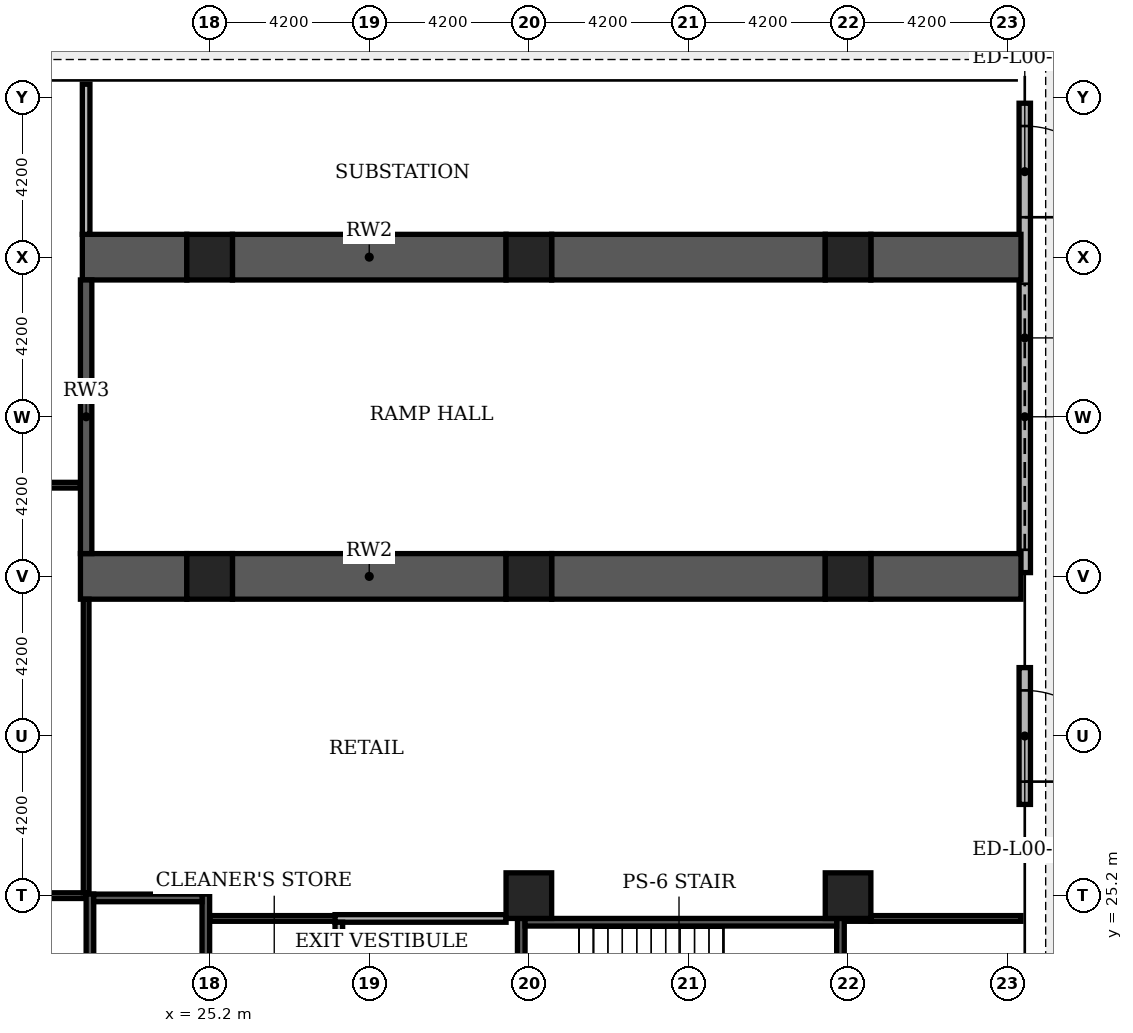
"""IFC4 building model, lengths in metres.
Left out: names, types, materials, properties, quantities, classifications, styles, units other than length and angle.
Written with IfcOpenShell. Run it as: python <this file> out.ifc"""

import sys

from ifc_helpers import new_model, si_unit, direction, frame, frame_2d, origin, origin_2d, place, context, subcontext, project, spatial, rectangle, extrude, element, fill, save


model = new_model("IFC4")
c1 = context("Model", 3, precision=1e-05, world=origin(), true_north=direction((0.0, 1.0)))
c2 = subcontext(c1, "Body", "Model", "MODEL_VIEW")
j1 = project(units=[si_unit("LENGTHUNIT", "METRE"), si_unit("PLANEANGLEUNIT", "RADIAN")], contexts=[c1])
p1 = place(None, origin())
s1 = spatial("IfcSite", under=j1, at=p1, CompositionType="ELEMENT")
p2 = place(p1, origin())
s2 = spatial("IfcBuilding", under=s1, at=p2, CompositionType="ELEMENT")
p3 = place(p2, origin())
s3 = spatial("IfcBuildingStorey", under=s2, at=p3, CompositionType="ELEMENT", Elevation=0.0)
for number, where, z_axis, x_axis in (
    (1, (25.2, 33.6, 0.0), (0.0, 0.0, 1.0), (1.0, 0.0, 0.0)),
    (2, (25.2, 42.0, 0.0), (0.0, 0.0, 1.0), (1.0, 0.0, 0.0)),
    (3, (33.6, 25.2, 0.0), (0.0, 0.0, 1.0), (1.0, 0.0, 0.0)),
    (4, (33.6, 33.6, 0.0), (0.0, 0.0, 1.0), (1.0, 0.0, 0.0)),
    (5, (33.6, 42.0, 0.0), (0.0, 0.0, 1.0), (1.0, 0.0, 0.0)),
    (6, (42.0, 25.2, 0.0), (0.0, 0.0, 1.0), (1.0, 0.0, 0.0)),
    (7, (42.0, 33.6, 0.0), (0.0, 0.0, 1.0), (1.0, 0.0, 0.0)),
    (8, (42.0, 42.0, 0.0), (0.0, 0.0, 1.0), (1.0, 0.0, 0.0)),
):
    element("IfcColumn", number, at=place(p3, frame(where, z_axis=z_axis, x_axis=x_axis)), inside=s3, PredefinedType="COLUMN", context=c2, shape_type="SweptSolid", body=[
        extrude(rectangle(XDim=1.2, YDim=1.2, at=origin_2d()), origin(), (0.0, 0.0, 1.0), 7.2),
    ])
p4 = place(p3, frame((46.65, 27.6, 0.0), z_axis=(0.0, 0.0, 1.0), x_axis=(0.0, 1.0, 0.0)))
e9 = element("IfcWall", 9, at=p4, inside=s3, PredefinedType="STANDARD", context=c2, shape_type="SweptSolid", body=[
    extrude(rectangle(XDim=3.6, YDim=0.3, at=frame_2d((1.8, 0.0))), origin(), (0.0, 0.0, 1.0), 6.78),
])
p5 = place(p4, frame((0.6, 0.0, 0.0)))
e10 = element("IfcOpeningElement", 10, at=p5, cuts=e9, PredefinedType="OPENING", context=c2, shape_type="SweptSolid", body=[
    extrude(rectangle(XDim=2.4, YDim=2.4, at=frame_2d((1.2, 1.2))), frame((0.0, 0.16, 0.0), z_axis=(0.0, -1.0, 0.0), x_axis=(1.0, 0.0, 0.0)), (0.0, 0.0, 1.0), 0.32),
])
p6 = place(p3, frame((46.65, 33.7, 0.0), z_axis=(0.0, 0.0, 1.0), x_axis=(0.0, 1.0, 0.0)))
e11 = element("IfcWall", 11, at=p6, inside=s3, PredefinedType="STANDARD", context=c2, shape_type="SweptSolid", body=[
    extrude(rectangle(XDim=12.35, YDim=0.3, at=frame_2d((6.175, 0.0))), origin(), (0.0, 0.0, 1.0), 6.78),
])
p7 = place(p6, frame((0.6, 0.0, 0.0)))
e12 = element("IfcOpeningElement", 12, at=p7, cuts=e11, PredefinedType="OPENING", context=c2, shape_type="SweptSolid", body=[
    extrude(rectangle(XDim=7.0, YDim=3.0, at=frame_2d((3.5, 1.5))), frame((0.0, 0.16, 0.0), z_axis=(0.0, -1.0, 0.0), x_axis=(1.0, 0.0, 0.0)), (0.0, 0.0, 1.0), 0.32),
])
p8 = place(p6, frame((9.35, 0.0, 0.0)))
e13 = element("IfcOpeningElement", 13, at=p8, cuts=e11, PredefinedType="OPENING", context=c2, shape_type="SweptSolid", body=[
    extrude(rectangle(XDim=2.4, YDim=2.4, at=frame_2d((1.2, 1.2))), frame((0.0, 0.16, 0.0), z_axis=(0.0, -1.0, 0.0), x_axis=(1.0, 0.0, 0.0)), (0.0, 0.0, 1.0), 0.32),
])
p9 = place(p3, frame((25.2, 24.6, 0.0), z_axis=(0.0, 0.0, 1.0), x_axis=(1.0, 0.0, 0.0)))
e14 = element("IfcWall", 14, at=p9, inside=s3, PredefinedType="PARTITIONING", context=c2, shape_type="SweptSolid", body=[
    extrude(rectangle(XDim=3.5, YDim=0.15, at=frame_2d((1.75, 0.0))), origin(), (0.0, 0.0, 1.0), 6.78),
])
p10 = place(p3, frame((28.5, 24.6, 0.0), z_axis=(0.0, 0.0, 1.0), x_axis=(1.0, 0.0, 0.0)))
e15 = element("IfcWall", 15, at=p10, inside=s3, PredefinedType="PARTITIONING", context=c2, shape_type="SweptSolid", body=[
    extrude(rectangle(XDim=4.5, YDim=0.2, at=frame_2d((2.25, 0.0))), origin(), (0.0, 0.0, 1.0), 6.78),
])
p11 = place(p3, frame((41.9, 24.6, 0.0), z_axis=(0.0, 0.0, 1.0), x_axis=(1.0, 0.0, 0.0)))
e16 = element("IfcWall", 16, at=p11, inside=s3, PredefinedType="PARTITIONING", context=c2, shape_type="SweptSolid", body=[
    extrude(rectangle(XDim=0.7, YDim=0.15, at=frame_2d((0.35, 0.0))), origin(), (0.0, 0.0, 1.0), 6.78),
])
p12 = place(p3, frame((42.6, 24.6, 0.0), z_axis=(0.0, 0.0, 1.0), x_axis=(1.0, 0.0, 0.0)))
e17 = element("IfcWall", 17, at=p12, inside=s3, PredefinedType="PARTITIONING", context=c2, shape_type="SweptSolid", body=[
    extrude(rectangle(XDim=3.95, YDim=0.15, at=frame_2d((1.975, 0.0))), origin(), (0.0, 0.0, 1.0), 6.78),
])
p13 = place(p3, frame((17.4, 25.2, 0.0), z_axis=(0.0, 0.0, 1.0), x_axis=(1.0, 0.0, 0.0)))
e18 = element("IfcWall", 18, at=p13, inside=s3, PredefinedType="PARTITIONING", context=c2, shape_type="SweptSolid", body=[
    extrude(rectangle(XDim=4.55, YDim=0.15, at=frame_2d((2.275, 0.0))), origin(), (0.0, 0.0, 1.0), 6.48),
])
p14 = place(p3, frame((21.8, 33.6, 0.0), z_axis=(0.0, 0.0, 1.0), x_axis=(1.0, 0.0, 0.0)))
e19 = element("IfcWall", 19, at=p14, inside=s3, PredefinedType="SOLIDWALL", context=c2, shape_type="SweptSolid", body=[
    extrude(rectangle(XDim=2.8, YDim=1.2, at=frame_2d((1.4, 0.0))), origin(), (0.0, 0.0, 1.0), 6.78),
])
for number, where, z_axis, x_axis in (
    (20, (25.8, 33.6, 0.0), (0.0, 0.0, 1.0), (1.0, 0.0, 0.0)),
    (21, (34.2, 33.6, 0.0), (0.0, 0.0, 1.0), (1.0, 0.0, 0.0)),
):
    element("IfcWall", number, at=place(p3, frame(where, z_axis=z_axis, x_axis=x_axis)), inside=s3, PredefinedType="SOLIDWALL", context=c2, shape_type="SweptSolid", body=[
        extrude(rectangle(XDim=7.2, YDim=1.2, at=frame_2d((3.6, 0.0))), origin(), (0.0, 0.0, 1.0), 6.78),
    ])
p15 = place(p3, frame((42.6, 33.6, 0.0), z_axis=(0.0, 0.0, 1.0), x_axis=(1.0, 0.0, 0.0)))
e22 = element("IfcWall", 22, at=p15, inside=s3, PredefinedType="SOLIDWALL", context=c2, shape_type="SweptSolid", body=[
    extrude(rectangle(XDim=3.95, YDim=1.2, at=frame_2d((1.975, 0.0))), origin(), (0.0, 0.0, 1.0), 6.78),
])
p16 = place(p3, frame((8.2, 36.0, 0.0), z_axis=(0.0, 0.0, 1.0), x_axis=(1.0, 0.0, 0.0)))
e23 = element("IfcWall", 23, at=p16, inside=s3, PredefinedType="PARTITIONING", context=c2, shape_type="SweptSolid", body=[
    extrude(rectangle(XDim=13.6, YDim=0.15, at=frame_2d((6.8, 0.0))), origin(), (0.0, 0.0, 1.0), 6.38),
])
p17 = place(p3, frame((21.85, 42.0, 0.0), z_axis=(0.0, 0.0, 1.0), x_axis=(1.0, 0.0, 0.0)))
e24 = element("IfcWall", 24, at=p17, inside=s3, PredefinedType="SOLIDWALL", context=c2, shape_type="SweptSolid", body=[
    extrude(rectangle(XDim=2.75, YDim=1.2, at=frame_2d((1.375, 0.0))), origin(), (0.0, 0.0, 1.0), 6.78),
])
for number, where, z_axis, x_axis in (
    (25, (25.8, 42.0, 0.0), (0.0, 0.0, 1.0), (1.0, 0.0, 0.0)),
    (26, (34.2, 42.0, 0.0), (0.0, 0.0, 1.0), (1.0, 0.0, 0.0)),
):
    element("IfcWall", number, at=place(p3, frame(where, z_axis=z_axis, x_axis=x_axis)), inside=s3, PredefinedType="SOLIDWALL", context=c2, shape_type="SweptSolid", body=[
        extrude(rectangle(XDim=7.2, YDim=1.2, at=frame_2d((3.6, 0.0))), origin(), (0.0, 0.0, 1.0), 6.78),
    ])
p18 = place(p3, frame((42.6, 42.0, 0.0), z_axis=(0.0, 0.0, 1.0), x_axis=(1.0, 0.0, 0.0)))
e27 = element("IfcWall", 27, at=p18, inside=s3, PredefinedType="SOLIDWALL", context=c2, shape_type="SweptSolid", body=[
    extrude(rectangle(XDim=3.95, YDim=1.2, at=frame_2d((1.975, 0.0))), origin(), (0.0, 0.0, 1.0), 6.78),
])
p19 = place(p3, frame((21.95, 25.275, 0.0), z_axis=(0.0, 0.0, 1.0), x_axis=(0.0, 1.0, 0.0)))
e28 = element("IfcWall", 28, at=p19, inside=s3, PredefinedType="PARTITIONING", context=c2, shape_type="SweptSolid", body=[
    extrude(rectangle(XDim=7.725, YDim=0.15, at=frame_2d((3.863, 0.0))), origin(), (0.0, 0.0, 1.0), 6.78),
])
p20 = place(p3, frame((21.95, 34.2, 0.0), z_axis=(0.0, 0.0, 1.0), x_axis=(0.0, 1.0, 0.0)))
e29 = element("IfcWall", 29, at=p20, inside=s3, PredefinedType="SOLIDWALL", context=c2, shape_type="SweptSolid", body=[
    extrude(rectangle(XDim=7.2, YDim=0.3, at=frame_2d((3.6, 0.0))), origin(), (0.0, 0.0, 1.0), 6.78),
])
for number, where, z_axis, x_axis in (
    (30, (21.95, 42.6, 0.0), (0.0, 0.0, 1.0), (0.0, 1.0, 0.0)),
    (31, (28.6, 20.55, 0.0), (0.0, 0.0, 1.0), (0.0, 1.0, 0.0)),
):
    element("IfcWall", number, at=place(p3, frame(where, z_axis=z_axis, x_axis=x_axis)), inside=s3, PredefinedType="PARTITIONING", context=c2, shape_type="SweptSolid", body=[
        extrude(rectangle(XDim=3.95, YDim=0.2, at=frame_2d((1.975, 0.0))), origin(), (0.0, 0.0, 1.0), 6.78),
    ])
p21 = place(p3, frame((22.05, 18.5, 0.0), z_axis=(0.0, 0.0, 1.0), x_axis=(0.0, 1.0, 0.0)))
e32 = element("IfcWall", 32, at=p21, inside=s3, PredefinedType="SOLIDWALL", context=c2, shape_type="SweptSolid", body=[
    extrude(rectangle(XDim=6.74, YDim=0.2, at=frame_2d((3.37, 0.0))), origin(), (0.0, 0.0, 1.0), 6.78),
])
p22 = place(p3, frame((25.1, 18.5, 0.0), z_axis=(0.0, 0.0, 1.0), x_axis=(0.0, 1.0, 0.0)))
e33 = element("IfcWall", 33, at=p22, inside=s3, PredefinedType="SOLIDWALL", context=c2, shape_type="SweptSolid", body=[
    extrude(rectangle(XDim=6.74, YDim=0.2, at=frame_2d((3.37, 0.0))), origin(), (0.0, 0.0, 1.0), 6.38),
])
p23 = place(p3, frame((22.15, 25.14, 0.0), z_axis=(0.0, 0.0, 1.0), x_axis=(1.0, 0.0, 0.0)))
e34 = element("IfcWall", 34, at=p23, inside=s3, PredefinedType="SOLIDWALL", context=c2, shape_type="SweptSolid", body=[
    extrude(rectangle(XDim=2.85, YDim=0.2, at=frame_2d((1.425, 0.0))), origin(), (0.0, 0.0, 1.0), 6.48),
])
p24 = place(p3, frame((33.4, 20.45, 0.0), z_axis=(0.0, 0.0, 1.0), x_axis=(0.0, 1.0, 0.0)))
e35 = element("IfcWall", 35, at=p24, inside=s3, PredefinedType="SOLIDWALL", context=c2, shape_type="SweptSolid", body=[
    extrude(rectangle(XDim=4.15, YDim=0.2, at=frame_2d((2.075, 0.0))), origin(), (0.0, 0.0, 1.0), 6.38),
])
p25 = place(p24, frame((1.175, 0.0, 0.0)))
e36 = element("IfcOpeningElement", 36, at=p25, cuts=e35, PredefinedType="OPENING", context=c2, shape_type="SweptSolid", body=[
    extrude(rectangle(XDim=1.8, YDim=2.2, at=frame_2d((0.9, 1.1))), frame((0.0, 0.11, 0.0), z_axis=(0.0, -1.0, 0.0), x_axis=(1.0, 0.0, 0.0)), (0.0, 0.0, 1.0), 0.22),
])
p26 = place(p3, frame((41.8, 20.45, 0.0), z_axis=(0.0, 0.0, 1.0), x_axis=(0.0, 1.0, 0.0)))
e37 = element("IfcWall", 37, at=p26, inside=s3, PredefinedType="SOLIDWALL", context=c2, shape_type="SweptSolid", body=[
    extrude(rectangle(XDim=4.15, YDim=0.2, at=frame_2d((2.075, 0.0))), origin(), (0.0, 0.0, 1.0), 6.38),
])
p27 = place(p3, frame((33.5, 24.5, 0.0), z_axis=(0.0, 0.0, 1.0), x_axis=(1.0, 0.0, 0.0)))
e38 = element("IfcWall", 38, at=p27, inside=s3, PredefinedType="SOLIDWALL", context=c2, shape_type="SweptSolid", body=[
    extrude(rectangle(XDim=8.2, YDim=0.2, at=frame_2d((4.1, 0.0))), origin(), (0.0, 0.0, 1.0), 7.0),
])
p28 = place(p5, frame((2.4, 0.0, 0.0), z_axis=(0.0, 0.0, 1.0), x_axis=(-1.0, 0.0, 0.0)))
e39 = element("IfcDoor", 39, at=p28, inside=s3, OperationType="DOUBLE_DOOR_SINGLE_SWING", PredefinedType="DOOR", context=c2, shape_type="SweptSolid", body=[
    extrude(rectangle(XDim=2.4, YDim=2.4, at=frame_2d((1.2, 1.2))), frame((0.0, 0.025, 0.0), z_axis=(0.0, -1.0, 0.0), x_axis=(1.0, 0.0, 0.0)), (0.0, 0.0, 1.0), 0.05),
])
fill(e10, e39)
p29 = place(p7, origin())
e40 = element("IfcDoor", 40, at=p29, inside=s3, OperationType="ROLLINGUP", PredefinedType="GATE", context=c2, shape_type="SweptSolid", body=[
    extrude(rectangle(XDim=7.0, YDim=3.0, at=frame_2d((3.5, 1.5))), frame((0.0, 0.025, 0.0), z_axis=(0.0, -1.0, 0.0), x_axis=(1.0, 0.0, 0.0)), (0.0, 0.0, 1.0), 0.05),
])
fill(e12, e40)
p30 = place(p8, frame((2.4, 0.0, 0.0), z_axis=(0.0, 0.0, 1.0), x_axis=(-1.0, 0.0, 0.0)))
e41 = element("IfcDoor", 41, at=p30, inside=s3, OperationType="DOUBLE_DOOR_SINGLE_SWING", PredefinedType="DOOR", context=c2, shape_type="SweptSolid", body=[
    extrude(rectangle(XDim=2.4, YDim=2.4, at=frame_2d((1.2, 1.2))), frame((0.0, 0.025, 0.0), z_axis=(0.0, -1.0, 0.0), x_axis=(1.0, 0.0, 0.0)), (0.0, 0.0, 1.0), 0.05),
])
fill(e13, e41)
save(model, sys.argv[1])
